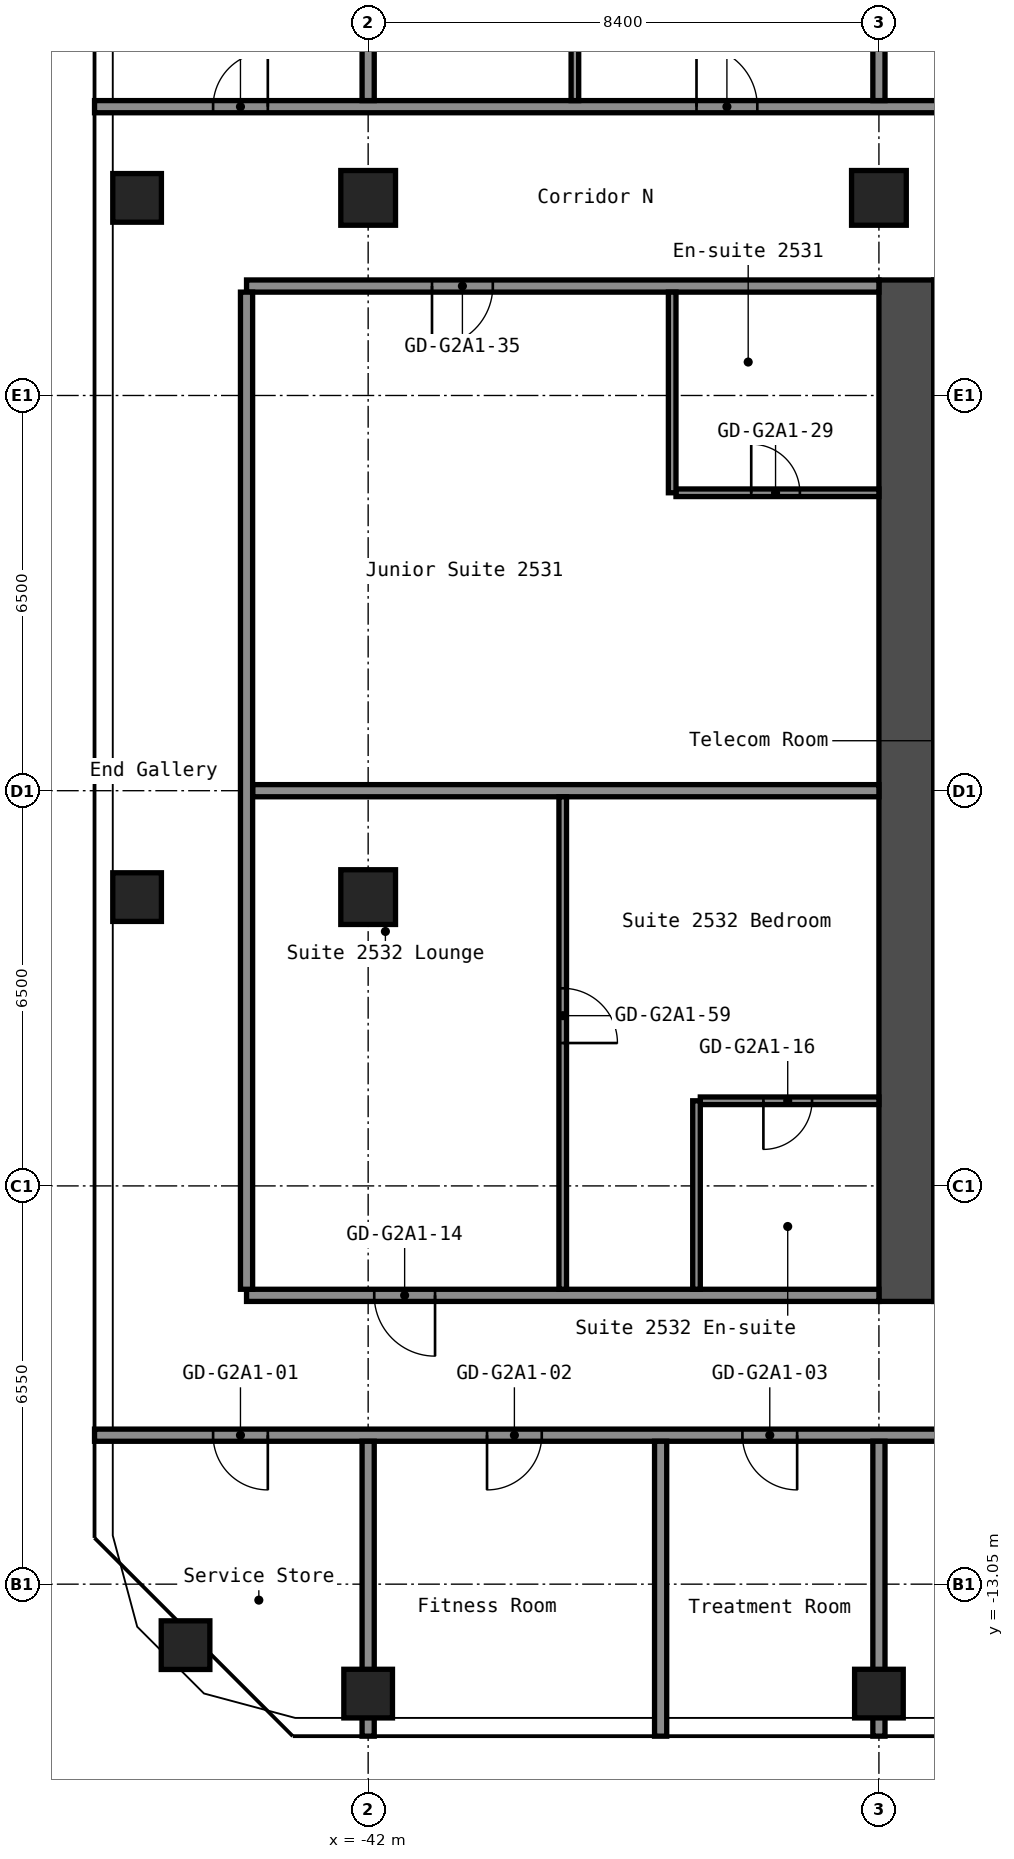
"""IFC4 building model, lengths in metres.
Left out: names, types, materials, properties, quantities, classifications, styles, units other than length and angle.
Written with IfcOpenShell. Run it as: python <this file> out.ifc"""

import sys

from ifc_helpers import new_model, si_unit, direction, frame, frame_2d, origin, origin_2d, place, context, subcontext, project, spatial, rectangle, hollow_rectangle, extrude, element, fill, save


model = new_model("IFC4")
c1 = context("Model", 3, precision=1e-05, world=origin(), true_north=direction((0.0, 1.0)))
c2 = subcontext(c1, "Body", "Model", "MODEL_VIEW")
j1 = project(units=[si_unit("LENGTHUNIT", "METRE"), si_unit("PLANEANGLEUNIT", "RADIAN")], contexts=[c1])
p1 = place(None, origin())
s1 = spatial("IfcSite", under=j1, at=p1, CompositionType="ELEMENT")
p2 = place(p1, origin())
s2 = spatial("IfcBuilding", under=s1, at=p2, CompositionType="ELEMENT")
p3 = place(p2, frame((0.0, 0.0, 91.4)))
s3 = spatial("IfcBuildingStorey", under=s2, at=p3, CompositionType="ELEMENT", Elevation=91.4)
for number, where, z_axis, x_axis in (
    (1, (-45.003, -14.053, 0.0), (0.0, 0.0, 1.0), (1.0, 0.0, 0.0)),
    (2, (-45.8, -1.75, 0.0), (0.0, 0.0, 1.0), (1.0, 0.0, 0.0)),
    (3, (-45.8, 9.75, 0.0), (0.0, 0.0, 1.0), (1.0, 0.0, 0.0)),
    (4, (-42.0, -14.85, 0.0), (0.0, 0.0, 1.0), (1.0, 0.0, 0.0)),
):
    element("IfcColumn", number, at=place(p3, frame(where, z_axis=z_axis, x_axis=x_axis)), inside=s3, PredefinedType="COLUMN", context=c2, shape_type="SweptSolid", body=[
        extrude(hollow_rectangle(XDim=0.8, YDim=0.8, WallThickness=0.032, at=origin_2d()), origin(), (0.0, 0.0, 1.0), 2.8),
    ])
for number, where, z_axis, x_axis in (
    (5, (-42.0, -1.75, 0.0), (0.0, 0.0, 1.0), (1.0, 0.0, 0.0)),
    (6, (-42.0, 9.75, 0.0), (0.0, 0.0, 1.0), (1.0, 0.0, 0.0)),
):
    element("IfcColumn", number, at=place(p3, frame(where, z_axis=z_axis, x_axis=x_axis)), inside=s3, PredefinedType="COLUMN", context=c2, shape_type="SweptSolid", body=[
        extrude(hollow_rectangle(XDim=0.9, YDim=0.9, WallThickness=0.036, at=origin_2d()), origin(), (0.0, 0.0, 1.0), 2.8),
    ])
p4 = place(p3, frame((-33.6, -14.85, 0.0), z_axis=(0.0, 0.0, 1.0), x_axis=(1.0, 0.0, 0.0)))
e7 = element("IfcColumn", 7, at=p4, inside=s3, PredefinedType="COLUMN", context=c2, shape_type="SweptSolid", body=[
    extrude(hollow_rectangle(XDim=0.8, YDim=0.8, WallThickness=0.032, at=origin_2d()), origin(), (0.0, 0.0, 1.0), 2.8),
])
p5 = place(p3, frame((-33.6, 9.75, 0.0), z_axis=(0.0, 0.0, 1.0), x_axis=(1.0, 0.0, 0.0)))
e8 = element("IfcColumn", 8, at=p5, inside=s3, PredefinedType="COLUMN", context=c2, shape_type="SweptSolid", body=[
    extrude(hollow_rectangle(XDim=0.9, YDim=0.9, WallThickness=0.036, at=origin_2d()), origin(), (0.0, 0.0, 1.0), 2.8),
])
p6 = place(p3, frame((-33.15, -8.4, 0.0), z_axis=(0.0, 0.0, 1.0), x_axis=(0.0, 1.0, 0.0)))
e9 = element("IfcWall", 9, at=p6, inside=s3, PredefinedType="SHEAR", context=c2, shape_type="SweptSolid", body=[
    extrude(rectangle(XDim=16.8, YDim=0.9, at=frame_2d((8.4, 0.0))), origin(), (0.0, 0.0, 1.0), 2.8),
])
p7 = place(p3, frame((-46.5, -10.6, 0.0), z_axis=(0.0, 0.0, 1.0), x_axis=(1.0, 0.0, 0.0)))
e10 = element("IfcWall", 10, at=p7, inside=s3, PredefinedType="PARTITIONING", context=c2, shape_type="SweptSolid", body=[
    extrude(rectangle(XDim=29.7, YDim=0.2, at=frame_2d((14.85, 0.0))), origin(), (0.0, 0.0, 1.0), 2.8),
])
p8 = place(p7, frame((1.95, 0.0, 0.0)))
e11 = element("IfcOpeningElement", 11, at=p8, cuts=e10, PredefinedType="OPENING", context=c2, shape_type="SweptSolid", body=[
    extrude(rectangle(XDim=0.9, YDim=2.1, at=frame_2d((0.45, 1.05))), frame((0.0, 0.11, 0.0), z_axis=(0.0, -1.0, 0.0), x_axis=(1.0, 0.0, 0.0)), (0.0, 0.0, 1.0), 0.22),
])
p9 = place(p7, frame((6.455, 0.0, 0.0)))
e12 = element("IfcOpeningElement", 12, at=p9, cuts=e10, PredefinedType="OPENING", context=c2, shape_type="SweptSolid", body=[
    extrude(rectangle(XDim=0.9, YDim=2.1, at=frame_2d((0.45, 1.05))), frame((0.0, 0.11, 0.0), z_axis=(0.0, -1.0, 0.0), x_axis=(1.0, 0.0, 0.0)), (0.0, 0.0, 1.0), 0.22),
])
p10 = place(p7, frame((10.655, 0.0, 0.0)))
e13 = element("IfcOpeningElement", 13, at=p10, cuts=e10, PredefinedType="OPENING", context=c2, shape_type="SweptSolid", body=[
    extrude(rectangle(XDim=0.9, YDim=2.1, at=frame_2d((0.45, 1.05))), frame((0.0, 0.11, 0.0), z_axis=(0.0, -1.0, 0.0), x_axis=(1.0, 0.0, 0.0)), (0.0, 0.0, 1.0), 0.22),
])
p11 = place(p7, frame((15.07, 0.0, 0.0)))
e14 = element("IfcOpeningElement", 14, at=p11, cuts=e10, PredefinedType="OPENING", context=c2, shape_type="SweptSolid", body=[
    extrude(rectangle(XDim=0.9, YDim=2.1, at=frame_2d((0.45, 1.05))), frame((0.0, 0.11, 0.0), z_axis=(0.0, -1.0, 0.0), x_axis=(1.0, 0.0, 0.0)), (0.0, 0.0, 1.0), 0.22),
])
p12 = place(p7, frame((19.27, 0.0, 0.0)))
e15 = element("IfcOpeningElement", 15, at=p12, cuts=e10, PredefinedType="OPENING", context=c2, shape_type="SweptSolid", body=[
    extrude(rectangle(XDim=0.9, YDim=2.1, at=frame_2d((0.45, 1.05))), frame((0.0, 0.11, 0.0), z_axis=(0.0, -1.0, 0.0), x_axis=(1.0, 0.0, 0.0)), (0.0, 0.0, 1.0), 0.22),
])
p13 = place(p7, frame((25.0, 0.0, 0.0)))
e16 = element("IfcOpeningElement", 16, at=p13, cuts=e10, PredefinedType="OPENING", context=c2, shape_type="SweptSolid", body=[
    extrude(rectangle(XDim=1.0, YDim=2.1, at=frame_2d((0.5, 1.05))), frame((0.0, 0.11, 0.0), z_axis=(0.0, -1.0, 0.0), x_axis=(1.0, 0.0, 0.0)), (0.0, 0.0, 1.0), 0.22),
])
p14 = place(p3, frame((-44.0, -8.3, 0.0), z_axis=(0.0, 0.0, 1.0), x_axis=(1.0, 0.0, 0.0)))
e17 = element("IfcWall", 17, at=p14, inside=s3, PredefinedType="PARTITIONING", context=c2, shape_type="SweptSolid", body=[
    extrude(rectangle(XDim=10.4, YDim=0.2, at=frame_2d((5.2, 0.0))), origin(), (0.0, 0.0, 1.0), 2.8),
])
p15 = place(p14, frame((2.1, 0.0, 0.0)))
e18 = element("IfcOpeningElement", 18, at=p15, cuts=e17, PredefinedType="OPENING", context=c2, shape_type="SweptSolid", body=[
    extrude(rectangle(XDim=1.0, YDim=2.1, at=frame_2d((0.5, 1.05))), frame((0.0, 0.11, 0.0), z_axis=(0.0, -1.0, 0.0), x_axis=(1.0, 0.0, 0.0)), (0.0, 0.0, 1.0), 0.22),
])
p16 = place(p3, frame((-36.538, -5.1, 0.0), z_axis=(0.0, 0.0, 1.0), x_axis=(1.0, 0.0, 0.0)))
e19 = element("IfcWall", 19, at=p16, inside=s3, PredefinedType="PARTITIONING", context=c2, shape_type="SweptSolid", body=[
    extrude(rectangle(XDim=2.938, YDim=0.125, at=frame_2d((1.469, 0.0))), origin(), (0.0, 0.0, 1.0), 2.8),
])
p17 = place(p16, frame((1.038, 0.0, 0.0)))
e20 = element("IfcOpeningElement", 20, at=p17, cuts=e19, PredefinedType="OPENING", context=c2, shape_type="SweptSolid", body=[
    extrude(rectangle(XDim=0.8, YDim=2.1, at=frame_2d((0.4, 1.05))), frame((0.0, 0.073, 0.0), z_axis=(0.0, -1.0, 0.0), x_axis=(1.0, 0.0, 0.0)), (0.0, 0.0, 1.0), 0.145),
])
p18 = place(p3, frame((-43.9, 0.0, 0.0), z_axis=(0.0, 0.0, 1.0), x_axis=(1.0, 0.0, 0.0)))
e21 = element("IfcWall", 21, at=p18, inside=s3, PredefinedType="PARTITIONING", context=c2, shape_type="SweptSolid", body=[
    extrude(rectangle(XDim=10.3, YDim=0.2, at=frame_2d((5.15, 0.0))), origin(), (0.0, 0.0, 1.0), 2.8),
])
p19 = place(p3, frame((-36.938, 4.9, 0.0), z_axis=(0.0, 0.0, 1.0), x_axis=(1.0, 0.0, 0.0)))
e22 = element("IfcWall", 22, at=p19, inside=s3, PredefinedType="PARTITIONING", context=c2, shape_type="SweptSolid", body=[
    extrude(rectangle(XDim=3.337, YDim=0.125, at=frame_2d((1.669, 0.0))), origin(), (0.0, 0.0, 1.0), 2.8),
])
p20 = place(p19, frame((1.238, 0.0, 0.0)))
e23 = element("IfcOpeningElement", 23, at=p20, cuts=e22, PredefinedType="OPENING", context=c2, shape_type="SweptSolid", body=[
    extrude(rectangle(XDim=0.8, YDim=2.1, at=frame_2d((0.4, 1.05))), frame((0.0, 0.073, 0.0), z_axis=(0.0, -1.0, 0.0), x_axis=(1.0, 0.0, 0.0)), (0.0, 0.0, 1.0), 0.145),
])
p21 = place(p3, frame((-44.0, 8.3, 0.0), z_axis=(0.0, 0.0, 1.0), x_axis=(1.0, 0.0, 0.0)))
e24 = element("IfcWall", 24, at=p21, inside=s3, PredefinedType="PARTITIONING", context=c2, shape_type="SweptSolid", body=[
    extrude(rectangle(XDim=10.4, YDim=0.2, at=frame_2d((5.2, 0.0))), origin(), (0.0, 0.0, 1.0), 2.8),
])
p22 = place(p21, frame((3.05, 0.0, 0.0)))
e25 = element("IfcOpeningElement", 25, at=p22, cuts=e24, PredefinedType="OPENING", context=c2, shape_type="SweptSolid", body=[
    extrude(rectangle(XDim=1.0, YDim=2.1, at=frame_2d((0.5, 1.05))), frame((0.0, 0.11, 0.0), z_axis=(0.0, -1.0, 0.0), x_axis=(1.0, 0.0, 0.0)), (0.0, 0.0, 1.0), 0.22),
])
p23 = place(p3, frame((-46.5, 11.25, 0.0), z_axis=(0.0, 0.0, 1.0), x_axis=(1.0, 0.0, 0.0)))
e26 = element("IfcWall", 26, at=p23, inside=s3, PredefinedType="PARTITIONING", context=c2, shape_type="SweptSolid", body=[
    extrude(rectangle(XDim=29.7, YDim=0.2, at=frame_2d((14.85, 0.0))), origin(), (0.0, 0.0, 1.0), 2.8),
])
p24 = place(p23, frame((1.95, 0.0, 0.0)))
e27 = element("IfcOpeningElement", 27, at=p24, cuts=e26, PredefinedType="OPENING", context=c2, shape_type="SweptSolid", body=[
    extrude(rectangle(XDim=0.9, YDim=2.1, at=frame_2d((0.45, 1.05))), frame((0.0, 0.11, 0.0), z_axis=(0.0, -1.0, 0.0), x_axis=(1.0, 0.0, 0.0)), (0.0, 0.0, 1.0), 0.22),
])
p25 = place(p23, frame((9.9, 0.0, 0.0)))
e28 = element("IfcOpeningElement", 28, at=p25, cuts=e26, PredefinedType="OPENING", context=c2, shape_type="SweptSolid", body=[
    extrude(rectangle(XDim=1.0, YDim=2.1, at=frame_2d((0.5, 1.05))), frame((0.0, 0.11, 0.0), z_axis=(0.0, -1.0, 0.0), x_axis=(1.0, 0.0, 0.0)), (0.0, 0.0, 1.0), 0.22),
])
p26 = place(p23, frame((14.9, 0.0, 0.0)))
e29 = element("IfcOpeningElement", 29, at=p26, cuts=e26, PredefinedType="OPENING", context=c2, shape_type="SweptSolid", body=[
    extrude(rectangle(XDim=1.0, YDim=2.1, at=frame_2d((0.5, 1.05))), frame((0.0, 0.11, 0.0), z_axis=(0.0, -1.0, 0.0), x_axis=(1.0, 0.0, 0.0)), (0.0, 0.0, 1.0), 0.22),
])
p27 = place(p23, frame((23.3, 0.0, 0.0)))
e30 = element("IfcOpeningElement", 30, at=p27, cuts=e26, PredefinedType="OPENING", context=c2, shape_type="SweptSolid", body=[
    extrude(rectangle(XDim=1.0, YDim=2.1, at=frame_2d((0.5, 1.05))), frame((0.0, 0.11, 0.0), z_axis=(0.0, -1.0, 0.0), x_axis=(1.0, 0.0, 0.0)), (0.0, 0.0, 1.0), 0.22),
])
p28 = place(p3, frame((-44.0, -8.2, 0.0), z_axis=(0.0, 0.0, 1.0), x_axis=(0.0, 1.0, 0.0)))
e31 = element("IfcWall", 31, at=p28, inside=s3, PredefinedType="PARTITIONING", context=c2, shape_type="SweptSolid", body=[
    extrude(rectangle(XDim=16.4, YDim=0.2, at=frame_2d((8.2, 0.0))), origin(), (0.0, 0.0, 1.0), 2.8),
])
p29 = place(p3, frame((-42.0, -15.55, 0.0), z_axis=(0.0, 0.0, 1.0), x_axis=(0.0, 1.0, 0.0)))
e32 = element("IfcWall", 32, at=p29, inside=s3, PredefinedType="PARTITIONING", context=c2, shape_type="SweptSolid", body=[
    extrude(rectangle(XDim=4.85, YDim=0.2, at=frame_2d((2.425, 0.0))), origin(), (0.0, 0.0, 1.0), 2.8),
])
p30 = place(p3, frame((-42.0, 11.35, 0.0), z_axis=(0.0, 0.0, 1.0), x_axis=(0.0, 1.0, 0.0)))
e33 = element("IfcWall", 33, at=p30, inside=s3, PredefinedType="PARTITIONING", context=c2, shape_type="SweptSolid", body=[
    extrude(rectangle(XDim=12.2, YDim=0.2, at=frame_2d((6.1, 0.0))), origin(), (0.0, 0.0, 1.0), 2.8),
])
p31 = place(p3, frame((-38.8, -8.2, 0.0), z_axis=(0.0, 0.0, 1.0), x_axis=(0.0, 1.0, 0.0)))
e34 = element("IfcWall", 34, at=p31, inside=s3, PredefinedType="PARTITIONING", context=c2, shape_type="SweptSolid", body=[
    extrude(rectangle(XDim=8.1, YDim=0.125, at=frame_2d((4.05, 0.0))), origin(), (0.0, 0.0, 1.0), 2.8),
])
p32 = place(p31, frame((4.05, 0.0, 0.0)))
e35 = element("IfcOpeningElement", 35, at=p32, cuts=e34, PredefinedType="OPENING", context=c2, shape_type="SweptSolid", body=[
    extrude(rectangle(XDim=0.9, YDim=2.1, at=frame_2d((0.45, 1.05))), frame((0.0, 0.073, 0.0), z_axis=(0.0, -1.0, 0.0), x_axis=(1.0, 0.0, 0.0)), (0.0, 0.0, 1.0), 0.145),
])
p33 = place(p3, frame((-38.6, 11.35, 0.0), z_axis=(0.0, 0.0, 1.0), x_axis=(0.0, 1.0, 0.0)))
e36 = element("IfcWall", 36, at=p33, inside=s3, PredefinedType="PARTITIONING", context=c2, shape_type="SweptSolid", body=[
    extrude(rectangle(XDim=3.3, YDim=0.125, at=frame_2d((1.65, 0.0))), origin(), (0.0, 0.0, 1.0), 2.8),
])
p34 = place(p3, frame((-37.19, -15.55, 0.0), z_axis=(0.0, 0.0, 1.0), x_axis=(0.0, 1.0, 0.0)))
e37 = element("IfcWall", 37, at=p34, inside=s3, PredefinedType="PARTITIONING", context=c2, shape_type="SweptSolid", body=[
    extrude(rectangle(XDim=4.85, YDim=0.2, at=frame_2d((2.425, 0.0))), origin(), (0.0, 0.0, 1.0), 2.8),
])
p35 = place(p3, frame((-37.0, 4.9, 0.0), z_axis=(0.0, 0.0, 1.0), x_axis=(0.0, 1.0, 0.0)))
e38 = element("IfcWall", 38, at=p35, inside=s3, PredefinedType="PARTITIONING", context=c2, shape_type="SweptSolid", body=[
    extrude(rectangle(XDim=3.3, YDim=0.125, at=frame_2d((1.65, 0.0))), origin(), (0.0, 0.0, 1.0), 2.8),
])
p36 = place(p3, frame((-36.6, -8.2, 0.0), z_axis=(0.0, 0.0, 1.0), x_axis=(0.0, 1.0, 0.0)))
e39 = element("IfcWall", 39, at=p36, inside=s3, PredefinedType="PARTITIONING", context=c2, shape_type="SweptSolid", body=[
    extrude(rectangle(XDim=3.1, YDim=0.125, at=frame_2d((1.55, 0.0))), origin(), (0.0, 0.0, 1.0), 2.8),
])
p37 = place(p3, frame((-33.6, -15.55, 0.0), z_axis=(0.0, 0.0, 1.0), x_axis=(0.0, 1.0, 0.0)))
e40 = element("IfcWall", 40, at=p37, inside=s3, PredefinedType="PARTITIONING", context=c2, shape_type="SweptSolid", body=[
    extrude(rectangle(XDim=4.85, YDim=0.2, at=frame_2d((2.425, 0.0))), origin(), (0.0, 0.0, 1.0), 2.8),
])
p38 = place(p3, frame((-33.6, 11.35, 0.0), z_axis=(0.0, 0.0, 1.0), x_axis=(0.0, 1.0, 0.0)))
e41 = element("IfcWall", 41, at=p38, inside=s3, PredefinedType="PARTITIONING", context=c2, shape_type="SweptSolid", body=[
    extrude(rectangle(XDim=12.2, YDim=0.2, at=frame_2d((6.1, 0.0))), origin(), (0.0, 0.0, 1.0), 2.8),
])
p39 = place(p8, origin())
e42 = element("IfcDoor", 42, at=p39, inside=s3, OperationType="SINGLE_SWING_RIGHT", PredefinedType="DOOR", context=c2, shape_type="SweptSolid", body=[
    extrude(rectangle(XDim=0.9, YDim=2.1, at=frame_2d((0.45, 1.05))), frame((0.0, 0.025, 0.0), z_axis=(0.0, -1.0, 0.0), x_axis=(1.0, 0.0, 0.0)), (0.0, 0.0, 1.0), 0.05),
])
fill(e11, e42)
p40 = place(p9, origin())
e43 = element("IfcDoor", 43, at=p40, inside=s3, OperationType="SINGLE_SWING_LEFT", PredefinedType="DOOR", context=c2, shape_type="SweptSolid", body=[
    extrude(rectangle(XDim=0.9, YDim=2.1, at=frame_2d((0.45, 1.05))), frame((0.0, 0.025, 0.0), z_axis=(0.0, -1.0, 0.0), x_axis=(1.0, 0.0, 0.0)), (0.0, 0.0, 1.0), 0.05),
])
fill(e12, e43)
p41 = place(p10, origin())
e44 = element("IfcDoor", 44, at=p41, inside=s3, OperationType="SINGLE_SWING_RIGHT", PredefinedType="DOOR", context=c2, shape_type="SweptSolid", body=[
    extrude(rectangle(XDim=0.9, YDim=2.1, at=frame_2d((0.45, 1.05))), frame((0.0, 0.025, 0.0), z_axis=(0.0, -1.0, 0.0), x_axis=(1.0, 0.0, 0.0)), (0.0, 0.0, 1.0), 0.05),
])
fill(e13, e44)
p42 = place(p15, origin())
e45 = element("IfcDoor", 45, at=p42, inside=s3, OperationType="SINGLE_SWING_RIGHT", PredefinedType="DOOR", context=c2, shape_type="SweptSolid", body=[
    extrude(rectangle(XDim=1.0, YDim=2.1, at=frame_2d((0.5, 1.05))), frame((0.0, 0.025, 0.0), z_axis=(0.0, -1.0, 0.0), x_axis=(1.0, 0.0, 0.0)), (0.0, 0.0, 1.0), 0.05),
])
fill(e18, e45)
p43 = place(p17, origin())
e46 = element("IfcDoor", 46, at=p43, inside=s3, OperationType="SINGLE_SWING_LEFT", PredefinedType="DOOR", context=c2, shape_type="SweptSolid", body=[
    extrude(rectangle(XDim=0.8, YDim=2.1, at=frame_2d((0.4, 1.05))), frame((0.0, 0.025, 0.0), z_axis=(0.0, -1.0, 0.0), x_axis=(1.0, 0.0, 0.0)), (0.0, 0.0, 1.0), 0.05),
])
fill(e20, e46)
p44 = place(p20, origin())
e47 = element("IfcDoor", 47, at=p44, inside=s3, OperationType="SINGLE_SWING_RIGHT", PredefinedType="DOOR", context=c2, shape_type="SweptSolid", body=[
    extrude(rectangle(XDim=0.8, YDim=2.1, at=frame_2d((0.4, 1.05))), frame((0.0, 0.025, 0.0), z_axis=(0.0, -1.0, 0.0), x_axis=(1.0, 0.0, 0.0)), (0.0, 0.0, 1.0), 0.05),
])
fill(e23, e47)
p45 = place(p22, origin())
e48 = element("IfcDoor", 48, at=p45, inside=s3, OperationType="SINGLE_SWING_LEFT", PredefinedType="DOOR", context=c2, shape_type="SweptSolid", body=[
    extrude(rectangle(XDim=1.0, YDim=2.1, at=frame_2d((0.5, 1.05))), frame((0.0, 0.025, 0.0), z_axis=(0.0, -1.0, 0.0), x_axis=(1.0, 0.0, 0.0)), (0.0, 0.0, 1.0), 0.05),
])
fill(e25, e48)
p46 = place(p24, origin())
e49 = element("IfcDoor", 49, at=p46, inside=s3, OperationType="SINGLE_SWING_LEFT", PredefinedType="DOOR", context=c2, shape_type="SweptSolid", body=[
    extrude(rectangle(XDim=0.9, YDim=2.1, at=frame_2d((0.45, 1.05))), frame((0.0, 0.025, 0.0), z_axis=(0.0, -1.0, 0.0), x_axis=(1.0, 0.0, 0.0)), (0.0, 0.0, 1.0), 0.05),
])
fill(e27, e49)
p47 = place(p25, origin())
e50 = element("IfcDoor", 50, at=p47, inside=s3, OperationType="SINGLE_SWING_RIGHT", PredefinedType="DOOR", context=c2, shape_type="SweptSolid", body=[
    extrude(rectangle(XDim=1.0, YDim=2.1, at=frame_2d((0.5, 1.05))), frame((0.0, 0.025, 0.0), z_axis=(0.0, -1.0, 0.0), x_axis=(1.0, 0.0, 0.0)), (0.0, 0.0, 1.0), 0.05),
])
fill(e28, e50)
p48 = place(p32, origin())
e51 = element("IfcDoor", 51, at=p48, inside=s3, OperationType="SINGLE_SWING_LEFT", PredefinedType="DOOR", context=c2, shape_type="SweptSolid", body=[
    extrude(rectangle(XDim=0.9, YDim=2.1, at=frame_2d((0.45, 1.05))), frame((0.0, 0.025, 0.0), z_axis=(0.0, -1.0, 0.0), x_axis=(1.0, 0.0, 0.0)), (0.0, 0.0, 1.0), 0.05),
])
fill(e35, e51)
save(model, sys.argv[1])
